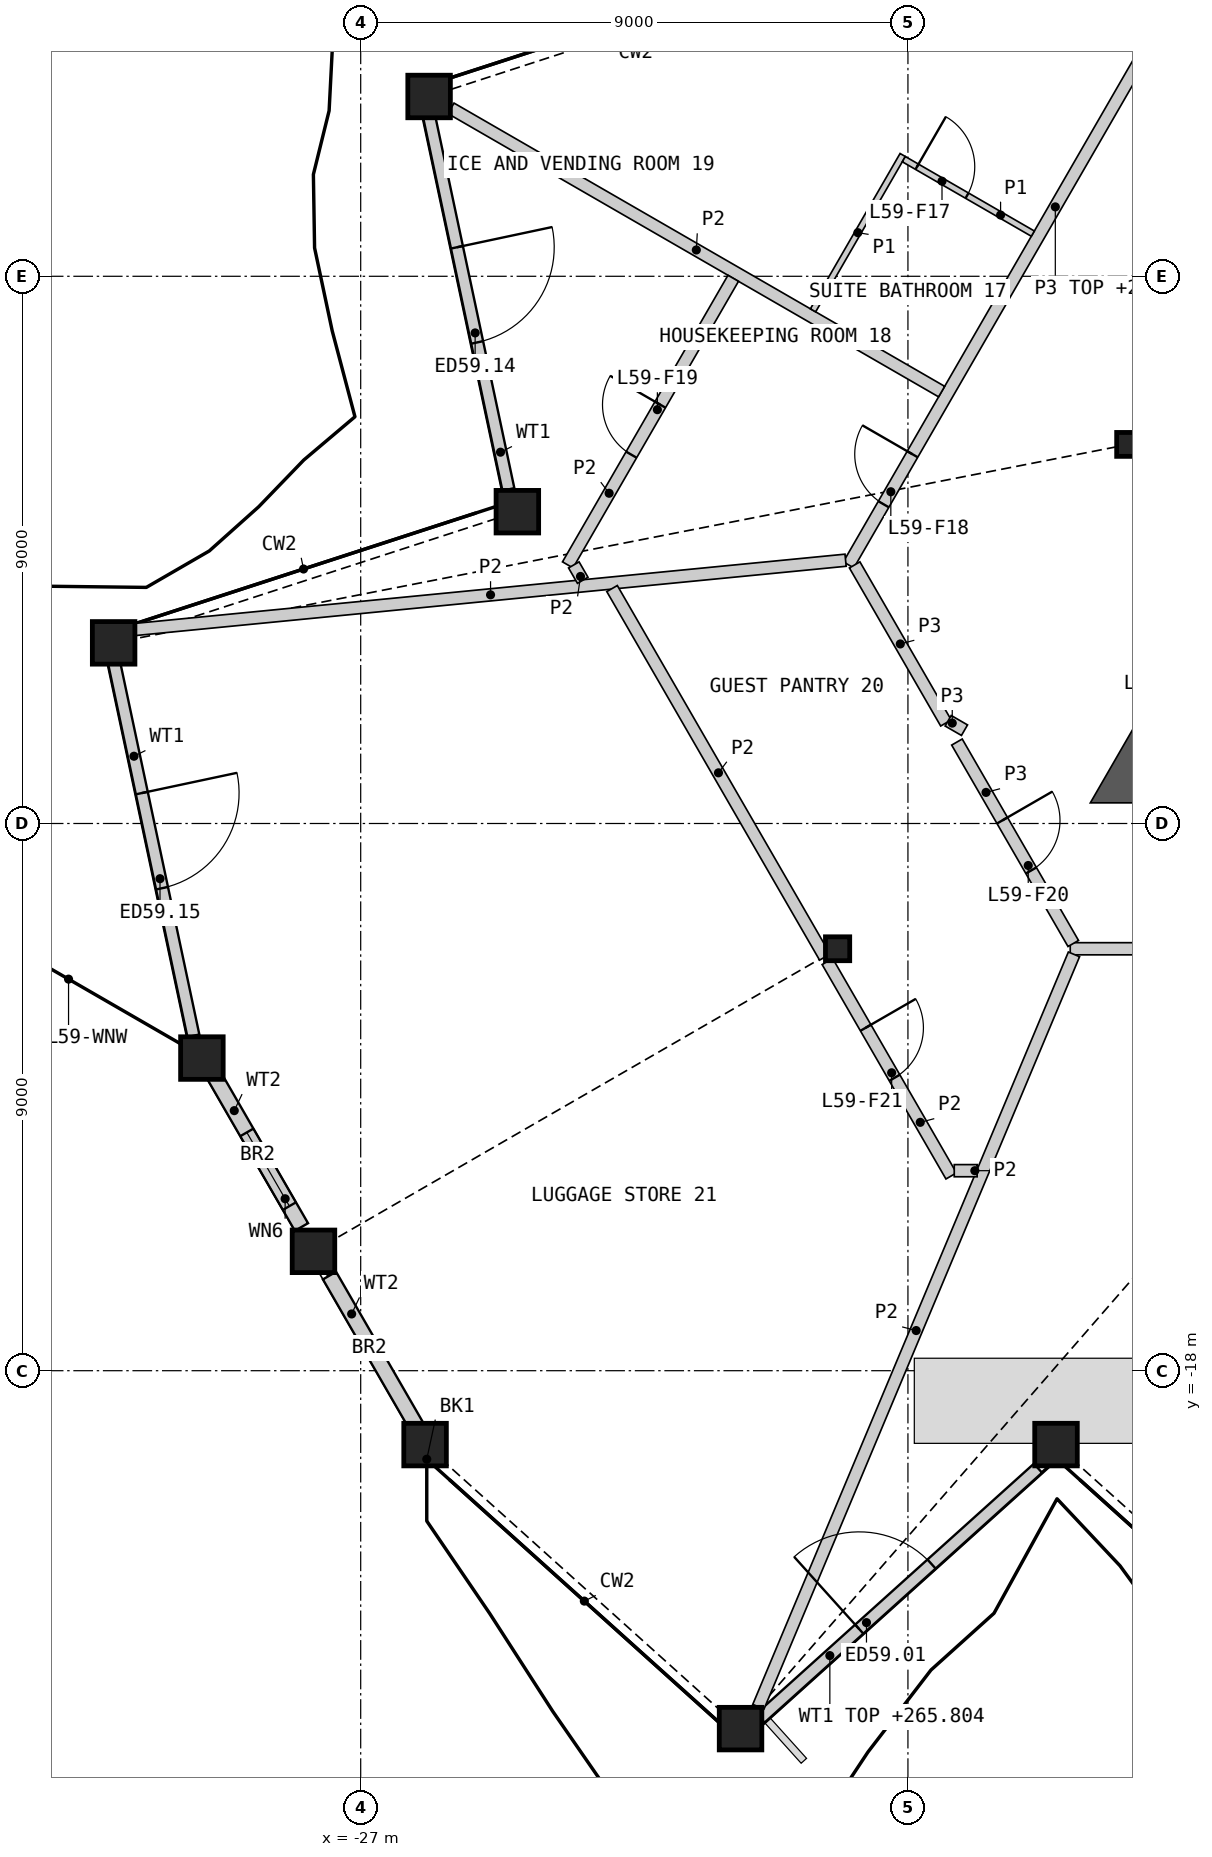
"""IFC4 building model, lengths in metres.
Left out: names, types, materials, properties, quantities, classifications, styles, units other than length and angle.
Written with IfcOpenShell. Run it as: python <this file> out.ifc"""

import sys

from ifc_helpers import new_model, si_unit, direction, frame, frame_2d, origin, origin_2d, place, context, subcontext, project, spatial, polyline, rectangle, hollow_rectangle, i_section, outline, extrude, element, fill, save


model = new_model("IFC4")
c1 = context("Model", 3, precision=1e-05, world=origin(), true_north=direction((0.0, 1.0)))
c2 = subcontext(c1, "Body", "Model", "MODEL_VIEW")
j1 = project(units=[si_unit("LENGTHUNIT", "METRE"), si_unit("PLANEANGLEUNIT", "RADIAN")], contexts=[c1])
p1 = place(None, origin())
s1 = spatial("IfcSite", under=j1, at=p1, CompositionType="ELEMENT")
p2 = place(p1, origin())
s2 = spatial("IfcBuilding", under=s1, at=p2, CompositionType="ELEMENT")
p3 = place(p2, frame((0.0, 0.0, 263.4)))
s3 = spatial("IfcBuildingStorey", under=s2, at=p3, CompositionType="ELEMENT", Elevation=263.4)
for number, where, z_axis, x_axis in (
    (1, (-25.941, -19.215, 0.0), (0.0, 0.0, 1.0), (1.0, 0.0, 0.0)),
    (2, (-20.753, -23.887, 0.0), (0.0, 0.0, 1.0), (1.0, 0.0, 0.0)),
    (3, (-15.565, -19.215, 0.0), (0.0, 0.0, 1.0), (1.0, 0.0, 0.0)),
    (4, (-25.875, 2.957, 0.0), (0.0, 0.0, 1.0), (1.0, 0.0, 0.0)),
    (5, (-24.423, -3.872, 0.0), (0.0, 0.0, 1.0), (1.0, 0.0, 0.0)),
    (6, (-31.063, -6.029, 0.0), (0.0, 0.0, 1.0), (1.0, 0.0, 0.0)),
    (7, (-29.612, -12.858, 0.0), (0.0, 0.0, 1.0), (1.0, 0.0, 0.0)),
    (8, (-27.776, -16.037, 0.0), (0.0, 0.0, 1.0), (1.0, 0.0, 0.0)),
):
    element("IfcColumn", number, at=place(p3, frame(where, z_axis=z_axis, x_axis=x_axis)), inside=s3, PredefinedType="COLUMN", context=c2, shape_type="SweptSolid", body=[
        extrude(hollow_rectangle(XDim=0.7, YDim=0.7, WallThickness=0.045, at=origin_2d()), origin(), (0.0, 0.0, 1.0), 3.6),
    ])
for number, where, z_axis, x_axis in (
    (9, (-14.368, -2.765, 0.0), (0.0, 0.0, 1.0), (1.0, 0.0, 0.0)),
    (10, (-19.157, -11.06, 0.0), (0.0, 0.0, 1.0), (1.0, 0.0, 0.0)),
):
    element("IfcColumn", number, at=place(p3, frame(where, z_axis=z_axis, x_axis=x_axis)), inside=s3, PredefinedType="COLUMN", context=c2, shape_type="SweptSolid", body=[
        extrude(i_section(OverallWidth=0.399, OverallDepth=0.393, WebThickness=0.023, FlangeThickness=0.037, at=origin_2d()), origin(), (0.0, 0.0, 1.0), 3.6),
    ])
p4 = place(p3, frame((-20.425, -23.713, 0.0), z_axis=(0.0, 0.0, 1.0), x_axis=(0.74316565197, 0.669107475472, 0.0)))
e11 = element("IfcWall", 11, at=p4, inside=s3, PredefinedType="SOLIDWALL", context=c2, shape_type="SweptSolid", body=[
    extrude(rectangle(XDim=6.142, YDim=0.2, at=frame_2d((3.071, 0.0))), origin(), (0.0, 0.0, 1.0), 2.404),
])
p5 = place(p4, frame((2.186, 0.0, 0.0)))
e12 = element("IfcOpeningElement", 12, at=p5, cuts=e11, PredefinedType="OPENING", context=c2, shape_type="SweptSolid", body=[
    extrude(rectangle(XDim=1.6, YDim=2.4, at=frame_2d((0.8, 1.2))), frame((0.0, 0.11, 0.0), z_axis=(0.0, -1.0, 0.0), x_axis=(1.0, 0.0, 0.0)), (0.0, 0.0, 1.0), 0.22),
])
p6 = place(p3, frame((-25.872, 2.615, 0.0), z_axis=(0.0, 0.0, 1.0), x_axis=(0.207882087744, -0.978153892593, 0.0)))
e13 = element("IfcWall", 13, at=p6, inside=s3, PredefinedType="SOLIDWALL", context=c2, shape_type="SweptSolid", body=[
    extrude(rectangle(XDim=6.257, YDim=0.2, at=frame_2d((3.129, 0.0))), origin(), (0.0, 0.0, 1.0), 2.701),
])
p7 = place(p6, frame((2.186, 0.0, 0.0)))
e14 = element("IfcOpeningElement", 14, at=p7, cuts=e13, PredefinedType="OPENING", context=c2, shape_type="SweptSolid", body=[
    extrude(rectangle(XDim=1.6, YDim=2.4, at=frame_2d((0.8, 1.2))), frame((0.0, 0.11, 0.0), z_axis=(0.0, -1.0, 0.0), x_axis=(1.0, 0.0, 0.0)), (0.0, 0.0, 1.0), 0.22),
])
p8 = place(p3, frame((-31.054, -6.361, 0.0), z_axis=(0.0, 0.0, 1.0), x_axis=(0.207937956549, -0.978142017412, 0.0)))
e15 = element("IfcWall", 15, at=p8, inside=s3, PredefinedType="SOLIDWALL", context=c2, shape_type="SweptSolid", body=[
    extrude(rectangle(XDim=6.267, YDim=0.2, at=frame_2d((3.134, 0.0))), origin(), (0.0, 0.0, 1.0), 2.701),
])
p9 = place(p8, frame((2.186, 0.0, 0.0)))
e16 = element("IfcOpeningElement", 16, at=p9, cuts=e15, PredefinedType="OPENING", context=c2, shape_type="SweptSolid", body=[
    extrude(rectangle(XDim=1.6, YDim=2.4, at=frame_2d((0.8, 1.2))), frame((0.0, 0.11, 0.0), z_axis=(0.0, -1.0, 0.0), x_axis=(1.0, 0.0, 0.0)), (0.0, 0.0, 1.0), 0.22),
])
p10 = place(p3, frame((-29.448, -13.085, 0.0), z_axis=(0.0, 0.0, 1.0), x_axis=(0.499971101808, -0.86604208752, 0.0)))
e17 = element("IfcWall", 17, at=p10, inside=s3, PredefinedType="SOLIDWALL", context=c2, shape_type="SweptSolid", body=[
    extrude(rectangle(XDim=2.947, YDim=0.25, at=frame_2d((1.473, 0.0))), origin(), (0.0, 0.0, 1.0), 2.701),
])
p11 = place(p10, frame((1.15, 0.0, 1.9)))
e18 = element("IfcOpeningElement", 18, at=p11, cuts=e17, PredefinedType="OPENING", context=c2, shape_type="SweptSolid", body=[
    extrude(rectangle(XDim=1.4, YDim=0.6, at=frame_2d((0.7, 0.3))), frame((0.0, 0.135, 0.0), z_axis=(0.0, -1.0, 0.0), x_axis=(1.0, 0.0, 0.0)), (0.0, 0.0, 1.0), 0.27),
])
p12 = place(p3, frame((-27.513, -16.436, 0.0), z_axis=(0.0, 0.0, 1.0), x_axis=(0.499949632511, -0.866054481515, 0.0)))
e19 = element("IfcWall", 19, at=p12, inside=s3, PredefinedType="SOLIDWALL", context=c2, shape_type="SweptSolid", body=[
    extrude(rectangle(XDim=2.915, YDim=0.25, at=frame_2d((1.458, 0.0))), origin(), (0.0, 0.0, 1.0), 2.701),
])
p13 = place(p3, origin())
e20 = element("IfcWall", 20, at=p13, inside=s3, PredefinedType="SHEAR", context=c2, shape_type="SweptSolid", body=[
    extrude(outline(polyline([(-13.874, -6.71), (-12.748, -7.36), (-12.748, -8.66), (-15.0, -8.66), (-13.874, -6.71)])), origin(), (0.0, 0.0, 1.0), 3.25),
])
p14 = place(p3, frame((-18.976, -4.747, 0.0), z_axis=(0.0, 0.0, 1.0), x_axis=(0.499999852422, 0.866025488988, 0.0)))
e21 = element("IfcWall", 21, at=p14, inside=s3, PredefinedType="PARTITIONING", context=c2, shape_type="SweptSolid", body=[
    extrude(rectangle(XDim=27.198, YDim=0.2, at=frame_2d((13.599, 0.0))), origin(), (0.0, 0.0, 1.0), 3.25),
])
p15 = place(p14, frame((19.886, 0.0, 0.0)))
e22 = element("IfcOpeningElement", 22, at=p15, cuts=e21, PredefinedType="OPENING", context=c2, shape_type="SweptSolid", body=[
    extrude(rectangle(XDim=0.95, YDim=2.1, at=frame_2d((0.475, 1.05))), frame((0.0, 0.11, 0.0), z_axis=(0.0, -1.0, 0.0), x_axis=(1.0, 0.0, 0.0)), (0.0, 0.0, 1.0), 0.22),
])
p16 = place(p14, frame((11.895, 0.0, 0.0)))
e23 = element("IfcOpeningElement", 23, at=p16, cuts=e21, PredefinedType="OPENING", context=c2, shape_type="SweptSolid", body=[
    extrude(rectangle(XDim=1.1, YDim=2.1, at=frame_2d((0.55, 1.05))), frame((0.0, 0.11, 0.0), z_axis=(0.0, -1.0, 0.0), x_axis=(1.0, 0.0, 0.0)), (0.0, 0.0, 1.0), 0.22),
])
p17 = place(p14, frame((1.152, 0.0, 0.0)))
e24 = element("IfcOpeningElement", 24, at=p17, cuts=e21, PredefinedType="OPENING", context=c2, shape_type="SweptSolid", body=[
    extrude(rectangle(XDim=0.95, YDim=2.1, at=frame_2d((0.475, 1.05))), frame((0.0, 0.11, 0.0), z_axis=(0.0, -1.0, 0.0), x_axis=(1.0, 0.0, 0.0)), (0.0, 0.0, 1.0), 0.22),
])
p18 = place(p3, frame((-15.331, -11.06, 0.0), z_axis=(0.0, 0.0, 1.0), x_axis=(1.0, 0.0, 0.0)))
e25 = element("IfcWall", 25, at=p18, inside=s3, PredefinedType="PARTITIONING", context=c2, shape_type="SweptSolid", body=[
    extrude(rectangle(XDim=5.543, YDim=0.2, at=frame_2d((2.771, 0.0))), origin(), (0.0, 0.0, 1.0), 3.25),
])
p19 = place(p18, frame((1.973, 0.0, 0.0)))
e26 = element("IfcOpeningElement", 26, at=p19, cuts=e25, PredefinedType="OPENING", context=c2, shape_type="SweptSolid", body=[
    extrude(rectangle(XDim=1.8, YDim=2.1, at=frame_2d((0.9, 1.05))), frame((0.0, 0.11, 0.0), z_axis=(0.0, -1.0, 0.0), x_axis=(1.0, 0.0, 0.0)), (0.0, 0.0, 1.0), 0.22),
])
p20 = place(p3, frame((-17.194, -7.66, 0.0), z_axis=(0.0, 0.0, 1.0), x_axis=(0.499989446428, -0.866031496806, 0.0)))
e27 = element("IfcWall", 27, at=p20, inside=s3, PredefinedType="PARTITIONING", context=c2, shape_type="SweptSolid", body=[
    extrude(rectangle(XDim=3.826, YDim=0.2, at=frame_2d((1.913, 0.0))), origin(), (0.0, 0.0, 1.0), 3.25),
])
p21 = place(p20, frame((1.49, 0.0, 0.0)))
e28 = element("IfcOpeningElement", 28, at=p21, cuts=e27, PredefinedType="OPENING", context=c2, shape_type="SweptSolid", body=[
    extrude(rectangle(XDim=0.95, YDim=2.1, at=frame_2d((0.475, 1.05))), frame((0.0, 0.11, 0.0), z_axis=(0.0, -1.0, 0.0), x_axis=(1.0, 0.0, 0.0)), (0.0, 0.0, 1.0), 0.22),
])
p22 = place(p3, frame((-18.876, -4.747, 0.0), z_axis=(0.0, 0.0, 1.0), x_axis=(0.499952404951, -0.866052881055, 0.0)))
e29 = element("IfcWall", 29, at=p22, inside=s3, PredefinedType="PARTITIONING", context=c2, shape_type="SweptSolid", body=[
    extrude(rectangle(XDim=3.002, YDim=0.2, at=frame_2d((1.501, 0.0))), origin(), (0.0, 0.0, 1.0), 3.25),
])
p23 = place(p3, frame((-17.338, -7.31, 0.0), z_axis=(0.0, 0.0, 1.0), x_axis=(0.866054481515, -0.499949632511, 0.0)))
e30 = element("IfcWall", 30, at=p23, inside=s3, PredefinedType="PARTITIONING", context=c2, shape_type="SweptSolid", body=[
    extrude(rectangle(XDim=0.31, YDim=0.2, at=frame_2d((0.155, 0.0))), origin(), (0.0, 0.0, 1.0), 3.25),
])
p24 = place(p3, frame((-20.46, -23.527, 0.0), z_axis=(0.0, 0.0, 1.0), x_axis=(0.386788567553, 0.922168424969, 0.0)))
e31 = element("IfcWall", 31, at=p24, inside=s3, PredefinedType="PARTITIONING", context=c2, shape_type="SweptSolid", body=[
    extrude(rectangle(XDim=13.419, YDim=0.2, at=frame_2d((6.709, 0.0))), origin(), (0.0, 0.0, 1.0), 2.404),
])
p25 = place(p3, frame((-30.703, -5.809, 0.0), z_axis=(0.0, 0.0, 1.0), x_axis=(0.99527973335, 0.097047680974, 0.0)))
e32 = element("IfcWall", 32, at=p25, inside=s3, PredefinedType="PARTITIONING", context=c2, shape_type="SweptSolid", body=[
    extrude(rectangle(XDim=11.733, YDim=0.2, at=frame_2d((5.867, 0.0))), origin(), (0.0, 0.0, 1.0), 2.404),
])
p26 = place(p3, frame((-25.515, 2.762, 0.0), z_axis=(0.0, 0.0, 1.0), x_axis=(0.866025446298, -0.499999926364, 0.0)))
e33 = element("IfcWall", 33, at=p26, inside=s3, PredefinedType="PARTITIONING", context=c2, shape_type="SweptSolid", body=[
    extrude(rectangle(XDim=9.317, YDim=0.2, at=frame_2d((4.659, 0.0))), origin(), (0.0, 0.0, 1.0), 2.404),
])
p27 = place(p3, frame((-22.866, -5.136, 0.0), z_axis=(0.0, 0.0, 1.0), x_axis=(0.499988162555, -0.866032238029, 0.0)))
e34 = element("IfcWall", 34, at=p27, inside=s3, PredefinedType="PARTITIONING", context=c2, shape_type="SweptSolid", body=[
    extrude(rectangle(XDim=6.999, YDim=0.2, at=frame_2d((3.5, 0.0))), origin(), (0.0, 0.0, 1.0), 2.404),
])
p28 = place(p3, frame((-23.595, -4.747, 0.0), z_axis=(0.0, 0.0, 1.0), x_axis=(0.500003308737, 0.866023493476, 0.0)))
e35 = element("IfcWall", 35, at=p28, inside=s3, PredefinedType="PARTITIONING", context=c2, shape_type="SweptSolid", body=[
    extrude(rectangle(XDim=5.443, YDim=0.2, at=frame_2d((2.721, 0.0))), origin(), (0.0, 0.0, 1.0), 2.404),
])
p29 = place(p28, frame((2.093, 0.0, 0.0)))
e36 = element("IfcOpeningElement", 36, at=p29, cuts=e35, PredefinedType="OPENING", context=c2, shape_type="SweptSolid", body=[
    extrude(rectangle(XDim=0.95, YDim=2.1, at=frame_2d((0.475, 1.05))), frame((0.0, 0.11, 0.0), z_axis=(0.0, -1.0, 0.0), x_axis=(1.0, 0.0, 0.0)), (0.0, 0.0, 1.0), 0.22),
])
p30 = place(p3, frame((-19.325, -11.27, 0.0), z_axis=(0.0, 0.0, 1.0), x_axis=(0.500000928893, -0.866024867487, 0.0)))
e37 = element("IfcWall", 37, at=p30, inside=s3, PredefinedType="PARTITIONING", context=c2, shape_type="SweptSolid", body=[
    extrude(rectangle(XDim=4.073, YDim=0.2, at=frame_2d((2.036, 0.0))), origin(), (0.0, 0.0, 1.0), 2.404),
])
p31 = place(p30, frame((1.259, 0.0, 0.0)))
e38 = element("IfcOpeningElement", 38, at=p31, cuts=e37, PredefinedType="OPENING", context=c2, shape_type="SweptSolid", body=[
    extrude(rectangle(XDim=0.95, YDim=2.1, at=frame_2d((0.475, 1.05))), frame((0.0, 0.11, 0.0), z_axis=(0.0, -1.0, 0.0), x_axis=(1.0, 0.0, 0.0)), (0.0, 0.0, 1.0), 0.22),
])
p32 = place(p3, frame((-17.238, -14.71, 0.0), z_axis=(0.0, 0.0, 1.0), x_axis=(1.0, 0.0, 0.0)))
e39 = element("IfcWall", 39, at=p32, inside=s3, PredefinedType="PARTITIONING", context=c2, shape_type="SweptSolid", body=[
    extrude(rectangle(XDim=0.376, YDim=0.2, at=frame_2d((0.188, 0.0))), origin(), (0.0, 0.0, 1.0), 2.404),
])
p33 = place(p3, frame((-23.495, -4.747, 0.0), z_axis=(0.0, 0.0, 1.0), x_axis=(0.500180211149, -0.865921333826, 0.0)))
e40 = element("IfcWall", 40, at=p33, inside=s3, PredefinedType="PARTITIONING", context=c2, shape_type="SweptSolid", body=[
    extrude(rectangle(XDim=0.292, YDim=0.2, at=frame_2d((0.146, 0.0))), origin(), (0.0, 0.0, 1.0), 2.404),
])
p34 = place(p3, frame((-19.561, -0.56, 0.0), z_axis=(0.0, 0.0, 1.0), x_axis=(0.49997559174, 0.866039495442, 0.0)))
e41 = element("IfcWall", 41, at=p34, inside=s3, PredefinedType="PARTITIONING", context=c2, shape_type="SweptSolid", body=[
    extrude(rectangle(XDim=2.95, YDim=0.1, at=frame_2d((1.475, 0.0))), origin(), (0.0, 0.0, 1.0), 2.404),
])
p35 = place(p3, frame((-18.068, 1.927, 0.0), z_axis=(0.0, 0.0, 1.0), x_axis=(0.866014668023, -0.500018594424, 0.0)))
e42 = element("IfcWall", 42, at=p35, inside=s3, PredefinedType="PARTITIONING", context=c2, shape_type="SweptSolid", body=[
    extrude(rectangle(XDim=2.45, YDim=0.1, at=frame_2d((1.225, 0.0))), origin(), (0.0, 0.0, 1.0), 2.404),
])
p36 = place(p35, frame((0.25, 0.0, 0.0)))
e43 = element("IfcOpeningElement", 43, at=p36, cuts=e42, PredefinedType="OPENING", context=c2, shape_type="SweptSolid", body=[
    extrude(rectangle(XDim=0.95, YDim=2.1, at=frame_2d((0.475, 1.05))), frame((0.0, 0.06, 0.0), z_axis=(0.0, -1.0, 0.0), x_axis=(1.0, 0.0, 0.0)), (0.0, 0.0, 1.0), 0.12),
])
p37 = place(p5, origin())
e44 = element("IfcDoor", 44, at=p37, inside=s3, OperationType="DOUBLE_DOOR_SINGLE_SWING", PredefinedType="DOOR", context=c2, shape_type="SweptSolid", body=[
    extrude(rectangle(XDim=1.6, YDim=2.4, at=frame_2d((0.8, 1.2))), frame((0.0, 0.025, 0.0), z_axis=(0.0, -1.0, 0.0), x_axis=(1.0, 0.0, 0.0)), (0.0, 0.0, 1.0), 0.05),
])
fill(e12, e44)
p38 = place(p7, origin())
e45 = element("IfcDoor", 45, at=p38, inside=s3, OperationType="DOUBLE_DOOR_SINGLE_SWING", PredefinedType="DOOR", context=c2, shape_type="SweptSolid", body=[
    extrude(rectangle(XDim=1.6, YDim=2.4, at=frame_2d((0.8, 1.2))), frame((0.0, 0.025, 0.0), z_axis=(0.0, -1.0, 0.0), x_axis=(1.0, 0.0, 0.0)), (0.0, 0.0, 1.0), 0.05),
])
fill(e14, e45)
p39 = place(p9, origin())
e46 = element("IfcDoor", 46, at=p39, inside=s3, OperationType="DOUBLE_DOOR_SINGLE_SWING", PredefinedType="DOOR", context=c2, shape_type="SweptSolid", body=[
    extrude(rectangle(XDim=1.6, YDim=2.4, at=frame_2d((0.8, 1.2))), frame((0.0, 0.025, 0.0), z_axis=(0.0, -1.0, 0.0), x_axis=(1.0, 0.0, 0.0)), (0.0, 0.0, 1.0), 0.05),
])
fill(e16, e46)
p40 = place(p11, origin())
e47 = element("IfcWindow", 47, at=p40, inside=s3, PartitioningType="SINGLE_PANEL", PredefinedType="WINDOW", context=c2, shape_type="SweptSolid", body=[
    extrude(rectangle(XDim=1.4, YDim=0.6, at=frame_2d((0.7, 0.3))), frame((0.0, 0.03, 0.0), z_axis=(0.0, -1.0, 0.0), x_axis=(1.0, 0.0, 0.0)), (0.0, 0.0, 1.0), 0.06),
])
fill(e18, e47)
p41 = place(p36, origin())
e48 = element("IfcDoor", 48, at=p41, inside=s3, OperationType="SINGLE_SWING_LEFT", PredefinedType="DOOR", context=c2, shape_type="SweptSolid", body=[
    extrude(rectangle(XDim=0.95, YDim=2.1, at=frame_2d((0.475, 1.05))), frame((0.0, 0.025, 0.0), z_axis=(0.0, -1.0, 0.0), x_axis=(1.0, 0.0, 0.0)), (0.0, 0.0, 1.0), 0.05),
])
fill(e43, e48)
p42 = place(p17, origin())
e49 = element("IfcDoor", 49, at=p42, inside=s3, OperationType="SINGLE_SWING_RIGHT", PredefinedType="DOOR", context=c2, shape_type="SweptSolid", body=[
    extrude(rectangle(XDim=0.95, YDim=2.1, at=frame_2d((0.475, 1.05))), frame((0.0, 0.025, 0.0), z_axis=(0.0, -1.0, 0.0), x_axis=(1.0, 0.0, 0.0)), (0.0, 0.0, 1.0), 0.05),
])
fill(e24, e49)
p43 = place(p29, origin())
e50 = element("IfcDoor", 50, at=p43, inside=s3, OperationType="SINGLE_SWING_RIGHT", PredefinedType="DOOR", context=c2, shape_type="SweptSolid", body=[
    extrude(rectangle(XDim=0.95, YDim=2.1, at=frame_2d((0.475, 1.05))), frame((0.0, 0.025, 0.0), z_axis=(0.0, -1.0, 0.0), x_axis=(1.0, 0.0, 0.0)), (0.0, 0.0, 1.0), 0.05),
])
fill(e36, e50)
p44 = place(p21, origin())
e51 = element("IfcDoor", 51, at=p44, inside=s3, OperationType="SINGLE_SWING_LEFT", PredefinedType="DOOR", context=c2, shape_type="SweptSolid", body=[
    extrude(rectangle(XDim=0.95, YDim=2.1, at=frame_2d((0.475, 1.05))), frame((0.0, 0.025, 0.0), z_axis=(0.0, -1.0, 0.0), x_axis=(1.0, 0.0, 0.0)), (0.0, 0.0, 1.0), 0.05),
])
fill(e28, e51)
p45 = place(p31, origin())
e52 = element("IfcDoor", 52, at=p45, inside=s3, OperationType="SINGLE_SWING_LEFT", PredefinedType="DOOR", context=c2, shape_type="SweptSolid", body=[
    extrude(rectangle(XDim=0.95, YDim=2.1, at=frame_2d((0.475, 1.05))), frame((0.0, 0.025, 0.0), z_axis=(0.0, -1.0, 0.0), x_axis=(1.0, 0.0, 0.0)), (0.0, 0.0, 1.0), 0.05),
])
fill(e38, e52)
save(model, sys.argv[1])
